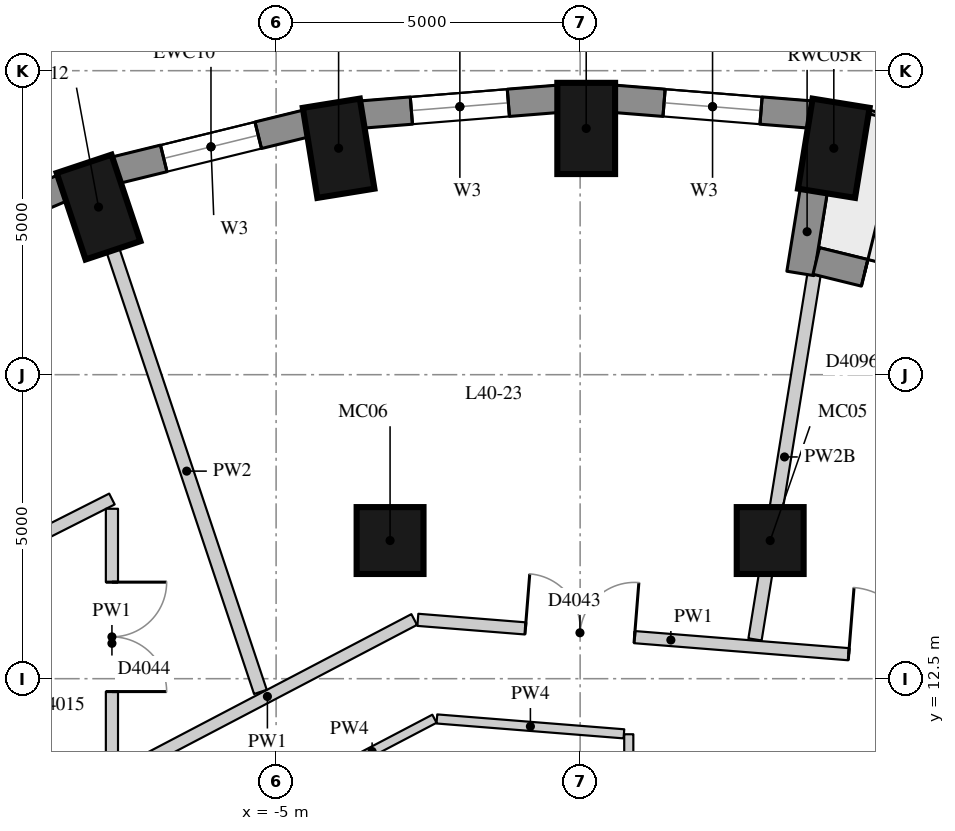
"""IFC4 building model, lengths in metres.
Left out: names, types, materials, properties, quantities, classifications, styles, units other than length and angle.
Written with IfcOpenShell. Run it as: python <this file> out.ifc"""

import sys

from ifc_helpers import new_model, si_unit, direction, frame, frame_2d, origin, origin_2d, place, context, subcontext, project, spatial, rectangle, extrude, element, fill, save


model = new_model("IFC4")
c1 = context("Model", 3, precision=1e-05, world=origin(), true_north=direction((0.0, 1.0)))
c2 = subcontext(c1, "Body", "Model", "MODEL_VIEW")
j1 = project(units=[si_unit("LENGTHUNIT", "METRE"), si_unit("PLANEANGLEUNIT", "RADIAN")], contexts=[c1])
p1 = place(None, origin())
s1 = spatial("IfcSite", under=j1, at=p1, CompositionType="ELEMENT")
p2 = place(p1, origin())
s2 = spatial("IfcBuilding", under=s1, at=p2, CompositionType="ELEMENT")
p3 = place(p2, frame((0.0, 0.0, 145.1)))
s3 = spatial("IfcBuildingStorey", under=s2, at=p3, CompositionType="ELEMENT", Elevation=145.1)
for number, where, z_axis, x_axis in (
    (1, (4.172, 21.224, 0.0), (0.0, 0.0, 1.0), (0.16, 0.987, 0.0)),
    (2, (0.1, 21.55, 0.0), (0.0, 0.0, 1.0), (0.0, 1.0, 0.0)),
    (3, (-3.972, 21.224, 0.0), (0.0, 0.0, 1.0), (-0.16, 0.987, 0.0)),
    (4, (-7.92, 20.256, 0.0), (0.0, 0.0, 1.0), (-0.317, 0.949, 0.0)),
):
    element("IfcColumn", number, at=place(p3, frame(where, z_axis=z_axis, x_axis=x_axis)), inside=s3, PredefinedType="COLUMN", context=c2, shape_type="SweptSolid", body=[
        extrude(rectangle(XDim=1.5, YDim=0.95, at=origin_2d()), origin(), (0.0, 0.0, 1.0), 3.3),
    ])
for number, where, z_axis, x_axis in (
    (5, (3.126, 14.772, 0.0), (0.0, 0.0, 1.0), (1.0, 0.0, 0.0)),
    (6, (-3.126, 14.772, 0.0), (0.0, 0.0, 1.0), (1.0, 0.0, 0.0)),
):
    element("IfcColumn", number, at=place(p3, frame(where, z_axis=z_axis, x_axis=x_axis)), inside=s3, PredefinedType="COLUMN", context=c2, shape_type="SweptSolid", body=[
        extrude(rectangle(XDim=1.1, YDim=1.1, at=origin_2d()), origin(), (0.0, 0.0, 1.0), 3.3),
    ])
p4 = place(p3, frame((3.801, 21.778, 0.0), z_axis=(0.0, 0.0, 1.0), x_axis=(-0.996812416891, 0.079780984773, 0.0)))
e7 = element("IfcWall", 7, at=p4, inside=s3, PredefinedType="SOLIDWALL", context=c2, shape_type="SweptSolid", body=[
    extrude(rectangle(XDim=3.256, YDim=0.45, at=frame_2d((1.628, 0.0))), origin(), (0.0, 0.0, 1.0), 3.02),
])
p5 = place(p4, frame((0.828, 0.0, 0.4)))
e8 = element("IfcOpeningElement", 8, at=p5, cuts=e7, PredefinedType="OPENING", context=c2, shape_type="SweptSolid", body=[
    extrude(rectangle(XDim=1.6, YDim=1.75, at=frame_2d((0.8, 0.875))), frame((0.0, 0.235, 0.0), z_axis=(0.0, -1.0, 0.0), x_axis=(1.0, 0.0, 0.0)), (0.0, 0.0, 1.0), 0.47),
])
p6 = place(p3, frame((-0.355, 22.038, 0.0), z_axis=(0.0, 0.0, 1.0), x_axis=(-0.996812416891, -0.079780984773, 0.0)))
e9 = element("IfcWall", 9, at=p6, inside=s3, PredefinedType="SOLIDWALL", context=c2, shape_type="SweptSolid", body=[
    extrude(rectangle(XDim=3.256, YDim=0.45, at=frame_2d((1.628, 0.0))), origin(), (0.0, 0.0, 1.0), 3.02),
])
p7 = place(p6, frame((0.828, 0.0, 0.4)))
e10 = element("IfcOpeningElement", 10, at=p7, cuts=e9, PredefinedType="OPENING", context=c2, shape_type="SweptSolid", body=[
    extrude(rectangle(XDim=1.6, YDim=1.75, at=frame_2d((0.8, 0.875))), frame((0.0, 0.235, 0.0), z_axis=(0.0, -1.0, 0.0), x_axis=(1.0, 0.0, 0.0)), (0.0, 0.0, 1.0), 0.47),
])
p8 = place(p3, frame((-4.499, 21.633, 0.0), z_axis=(0.0, 0.0, 1.0), x_axis=(-0.971232901476, -0.238131583563, 0.0)))
e11 = element("IfcWall", 11, at=p8, inside=s3, PredefinedType="SOLIDWALL", context=c2, shape_type="SweptSolid", body=[
    extrude(rectangle(XDim=3.237, YDim=0.45, at=frame_2d((1.618, 0.0))), origin(), (0.0, 0.0, 1.0), 3.02),
])
p9 = place(p8, frame((0.818, 0.0, 0.4)))
e12 = element("IfcOpeningElement", 12, at=p9, cuts=e11, PredefinedType="OPENING", context=c2, shape_type="SweptSolid", body=[
    extrude(rectangle(XDim=1.6, YDim=1.75, at=frame_2d((0.8, 0.875))), frame((0.0, 0.235, 0.0), z_axis=(0.0, -1.0, 0.0), x_axis=(1.0, 0.0, 0.0)), (0.0, 0.0, 1.0), 0.47),
])
p10 = place(p3, frame((-8.506, 20.574, 0.0), z_axis=(0.0, 0.0, 1.0), x_axis=(-0.919798725687, -0.392390499663, 0.0)))
e13 = element("IfcWall", 13, at=p10, inside=s3, PredefinedType="SOLIDWALL", context=c2, shape_type="SweptSolid", body=[
    extrude(rectangle(XDim=3.2, YDim=0.45, at=frame_2d((1.6, 0.0))), origin(), (0.0, 0.0, 1.0), 3.02),
])
p11 = place(p10, frame((0.8, 0.0, 0.4)))
e14 = element("IfcOpeningElement", 14, at=p11, cuts=e13, PredefinedType="OPENING", context=c2, shape_type="SweptSolid", body=[
    extrude(rectangle(XDim=1.6, YDim=1.75, at=frame_2d((0.8, 0.875))), frame((0.0, 0.235, 0.0), z_axis=(0.0, -1.0, 0.0), x_axis=(1.0, 0.0, 0.0)), (0.0, 0.0, 1.0), 0.47),
])
p12 = place(p3, frame((3.844, 20.538, 0.0), z_axis=(0.0, 0.0, 1.0), x_axis=(-0.159641024018, -0.98717513312, 0.0)))
e15 = element("IfcWall", 15, at=p12, inside=s3, PredefinedType="SOLIDWALL", context=c2, shape_type="SweptSolid", body=[
    extrude(rectangle(XDim=1.39, YDim=0.45, at=frame_2d((0.695, 0.0))), origin(), (0.0, 0.0, 1.0), 2.57),
])
p13 = place(p3, frame((7.563, 18.466, 0.0), z_axis=(0.0, 0.0, 1.0), x_axis=(-0.97110866251, 0.238637728782, 0.0)))
e16 = element("IfcWall", 16, at=p13, inside=s3, PredefinedType="SOLIDWALL", context=c2, shape_type="SweptSolid", body=[
    extrude(rectangle(XDim=3.789, YDim=0.45, at=frame_2d((1.895, 0.0))), origin(), (0.0, 0.0, 1.0), 3.02),
])
p14 = place(p13, frame((0.82, 0.0, 0.4)))
e17 = element("IfcOpeningElement", 17, at=p14, cuts=e16, PredefinedType="OPENING", context=c2, shape_type="SweptSolid", body=[
    extrude(rectangle(XDim=1.0, YDim=1.75, at=frame_2d((0.5, 0.875))), frame((0.0, 0.235, 0.0), z_axis=(0.0, -1.0, 0.0), x_axis=(1.0, 0.0, 0.0)), (0.0, 0.0, 1.0), 0.47),
])
p15 = place(p13, frame((1.97, 0.0, 0.0)))
e18 = element("IfcOpeningElement", 18, at=p15, cuts=e16, PredefinedType="OPENING", context=c2, shape_type="SweptSolid", body=[
    extrude(rectangle(XDim=1.0, YDim=2.15, at=frame_2d((0.5, 1.075))), frame((0.0, 0.235, 0.0), z_axis=(0.0, -1.0, 0.0), x_axis=(1.0, 0.0, 0.0)), (0.0, 0.0, 1.0), 0.47),
])
p16 = place(p3, frame((-10.416, 14.082, 0.0), z_axis=(0.0, 0.0, 1.0), x_axis=(0.892396808139, 0.451251522793, 0.0)))
e19 = element("IfcWall", 19, at=p16, inside=s3, PredefinedType="PARTITIONING", context=c2, shape_type="SweptSolid", body=[
    extrude(rectangle(XDim=3.044, YDim=0.2, at=frame_2d((1.522, 0.0))), origin(), (0.0, 0.0, 1.0), 3.02),
])
p17 = place(p3, frame((-7.7, 15.295, 0.0), z_axis=(0.0, 0.0, 1.0), x_axis=(0.0, -1.0, 0.0)))
e20 = element("IfcWall", 20, at=p17, inside=s3, PredefinedType="PARTITIONING", context=c2, shape_type="SweptSolid", body=[
    extrude(rectangle(XDim=4.427, YDim=0.2, at=frame_2d((2.214, 0.0))), origin(), (0.0, 0.0, 1.0), 3.02),
])
p18 = place(p17, frame((1.207, 0.0, 0.0)))
e21 = element("IfcOpeningElement", 21, at=p18, cuts=e20, PredefinedType="OPENING", context=c2, shape_type="SweptSolid", body=[
    extrude(rectangle(XDim=1.8, YDim=2.1, at=frame_2d((0.9, 1.05))), frame((0.0, 0.11, 0.0), z_axis=(0.0, -1.0, 0.0), x_axis=(1.0, 0.0, 0.0)), (0.0, 0.0, 1.0), 0.22),
])
p19 = place(p3, frame((-7.557, 10.942, 0.0), z_axis=(0.0, 0.0, 1.0), x_axis=(0.885672830659, 0.464309850244, 0.0)))
e22 = element("IfcWall", 22, at=p19, inside=s3, PredefinedType="PARTITIONING", context=c2, shape_type="SweptSolid", body=[
    extrude(rectangle(XDim=5.452, YDim=0.2, at=frame_2d((2.726, 0.0))), origin(), (0.0, 0.0, 1.0), 3.02),
])
p20 = place(p3, frame((-2.669, 13.468, 0.0), z_axis=(0.0, 0.0, 1.0), x_axis=(0.996831622407, -0.079540659849, 0.0)))
e23 = element("IfcWall", 23, at=p20, inside=s3, PredefinedType="PARTITIONING", context=c2, shape_type="SweptSolid", body=[
    extrude(rectangle(XDim=8.349, YDim=0.2, at=frame_2d((4.174, 0.0))), origin(), (0.0, 0.0, 1.0), 3.02),
])
p21 = place(p20, frame((7.109, 0.0, 0.0)))
e24 = element("IfcOpeningElement", 24, at=p21, cuts=e23, PredefinedType="OPENING", context=c2, shape_type="SweptSolid", body=[
    extrude(rectangle(XDim=1.1, YDim=2.1, at=frame_2d((0.55, 1.05))), frame((0.0, 0.11, 0.0), z_axis=(0.0, -1.0, 0.0), x_axis=(1.0, 0.0, 0.0)), (0.0, 0.0, 1.0), 0.22),
])
p22 = place(p20, frame((1.775, 0.0, 0.0)))
e25 = element("IfcOpeningElement", 25, at=p22, cuts=e23, PredefinedType="OPENING", context=c2, shape_type="SweptSolid", body=[
    extrude(rectangle(XDim=1.8, YDim=2.1, at=frame_2d((0.9, 1.05))), frame((0.0, 0.11, 0.0), z_axis=(0.0, -1.0, 0.0), x_axis=(1.0, 0.0, 0.0)), (0.0, 0.0, 1.0), 0.22),
])
p23 = place(p3, frame((0.8, 11.586, 0.0), z_axis=(0.0, 0.0, 1.0), x_axis=(0.0, -1.0, 0.0)))
e26 = element("IfcWall", 26, at=p23, inside=s3, PredefinedType="PARTITIONING", context=c2, shape_type="SweptSolid", body=[
    extrude(rectangle(XDim=2.436, YDim=0.15, at=frame_2d((1.218, 0.0))), origin(), (0.0, 0.0, 1.0), 3.02),
])
p24 = place(p23, frame((0.768, 0.0, 0.0)))
e27 = element("IfcOpeningElement", 27, at=p24, cuts=e26, PredefinedType="OPENING", context=c2, shape_type="SweptSolid", body=[
    extrude(rectangle(XDim=0.9, YDim=2.1, at=frame_2d((0.45, 1.05))), frame((0.0, 0.085, 0.0), z_axis=(0.0, -1.0, 0.0), x_axis=(1.0, 0.0, 0.0)), (0.0, 0.0, 1.0), 0.17),
])
p25 = place(p3, frame((-4.447, 10.766, 0.0), z_axis=(0.0, 0.0, 1.0), x_axis=(0.885701482048, 0.464255193507, 0.0)))
e28 = element("IfcWall", 28, at=p25, inside=s3, PredefinedType="PARTITIONING", context=c2, shape_type="SweptSolid", body=[
    extrude(rectangle(XDim=2.315, YDim=0.15, at=frame_2d((1.158, 0.0))), origin(), (0.0, 0.0, 1.0), 3.02),
])
p26 = place(p3, frame((-2.356, 11.838, 0.0), z_axis=(0.0, 0.0, 1.0), x_axis=(0.996845649151, -0.079364675829, 0.0)))
e29 = element("IfcWall", 29, at=p26, inside=s3, PredefinedType="PARTITIONING", context=c2, shape_type="SweptSolid", body=[
    extrude(rectangle(XDim=3.085, YDim=0.15, at=frame_2d((1.543, 0.0))), origin(), (0.0, 0.0, 1.0), 3.02),
])
p27 = place(p3, frame((3.847, 19.148, 0.0), z_axis=(0.0, 0.0, 1.0), x_axis=(-0.159656618209, -0.987172611179, 0.0)))
e30 = element("IfcWall", 30, at=p27, inside=s3, PredefinedType="PARTITIONING", context=c2, shape_type="SweptSolid", body=[
    extrude(rectangle(XDim=6.08, YDim=0.22, at=frame_2d((3.04, 0.0))), origin(), (0.0, 0.0, 1.0), 2.57),
])
p28 = place(p3, frame((-7.683, 19.545, 0.0), z_axis=(0.0, 0.0, 1.0), x_axis=(0.316706037399, -0.94852374028, 0.0)))
e31 = element("IfcWall", 31, at=p28, inside=s3, PredefinedType="PARTITIONING", context=c2, shape_type="SweptSolid", body=[
    extrude(rectangle(XDim=7.656, YDim=0.22, at=frame_2d((3.828, 0.0))), origin(), (0.0, 0.0, 1.0), 3.02),
])
p29 = place(p5, origin())
e32 = element("IfcWindow", 32, at=p29, inside=s3, PartitioningType="SINGLE_PANEL", PredefinedType="WINDOW", context=c2, shape_type="SweptSolid", body=[
    extrude(rectangle(XDim=1.6, YDim=1.75, at=frame_2d((0.8, 0.875))), frame((0.0, 0.035, 0.0), z_axis=(0.0, -1.0, 0.0), x_axis=(1.0, 0.0, 0.0)), (0.0, 0.0, 1.0), 0.06),
])
fill(e8, e32)
p30 = place(p7, origin())
e33 = element("IfcWindow", 33, at=p30, inside=s3, PartitioningType="SINGLE_PANEL", PredefinedType="WINDOW", context=c2, shape_type="SweptSolid", body=[
    extrude(rectangle(XDim=1.6, YDim=1.75, at=frame_2d((0.8, 0.875))), frame((0.0, 0.035, 0.0), z_axis=(0.0, -1.0, 0.0), x_axis=(1.0, 0.0, 0.0)), (0.0, 0.0, 1.0), 0.06),
])
fill(e10, e33)
p31 = place(p9, origin())
e34 = element("IfcWindow", 34, at=p31, inside=s3, PartitioningType="SINGLE_PANEL", PredefinedType="WINDOW", context=c2, shape_type="SweptSolid", body=[
    extrude(rectangle(XDim=1.6, YDim=1.75, at=frame_2d((0.8, 0.875))), frame((0.0, 0.035, 0.0), z_axis=(0.0, -1.0, 0.0), x_axis=(1.0, 0.0, 0.0)), (0.0, 0.0, 1.0), 0.06),
])
fill(e12, e34)
p32 = place(p15, frame((1.0, 0.0, 0.0), z_axis=(0.0, 0.0, 1.0), x_axis=(-1.0, 0.0, 0.0)))
e35 = element("IfcDoor", 35, at=p32, inside=s3, OperationType="SINGLE_SWING_LEFT", PredefinedType="DOOR", context=c2, shape_type="SweptSolid", body=[
    extrude(rectangle(XDim=1.0, YDim=2.15, at=frame_2d((0.5, 1.075))), frame((0.0, 0.075, 0.0), z_axis=(0.0, -1.0, 0.0), x_axis=(1.0, 0.0, 0.0)), (0.0, 0.0, 1.0), 0.05),
])
fill(e18, e35)
p33 = place(p21, origin())
e36 = element("IfcDoor", 36, at=p33, inside=s3, OperationType="SINGLE_SWING_LEFT", PredefinedType="DOOR", context=c2, shape_type="SweptSolid", body=[
    extrude(rectangle(XDim=1.1, YDim=2.1, at=frame_2d((0.55, 1.05))), frame((0.0, 0.025, 0.0), z_axis=(0.0, -1.0, 0.0), x_axis=(1.0, 0.0, 0.0)), (0.0, 0.0, 1.0), 0.05),
])
fill(e24, e36)
p34 = place(p22, origin())
e37 = element("IfcDoor", 37, at=p34, inside=s3, OperationType="DOUBLE_DOOR_SINGLE_SWING", PredefinedType="DOOR", context=c2, shape_type="SweptSolid", body=[
    extrude(rectangle(XDim=1.8, YDim=2.1, at=frame_2d((0.9, 1.05))), frame((0.0, 0.025, 0.0), z_axis=(0.0, -1.0, 0.0), x_axis=(1.0, 0.0, 0.0)), (0.0, 0.0, 1.0), 0.05),
])
fill(e25, e37)
p35 = place(p18, origin())
e38 = element("IfcDoor", 38, at=p35, inside=s3, OperationType="DOUBLE_DOOR_SINGLE_SWING", PredefinedType="DOOR", context=c2, shape_type="SweptSolid", body=[
    extrude(rectangle(XDim=1.8, YDim=2.1, at=frame_2d((0.9, 1.05))), frame((0.0, 0.025, 0.0), z_axis=(0.0, -1.0, 0.0), x_axis=(1.0, 0.0, 0.0)), (0.0, 0.0, 1.0), 0.05),
])
fill(e21, e38)
save(model, sys.argv[1])
